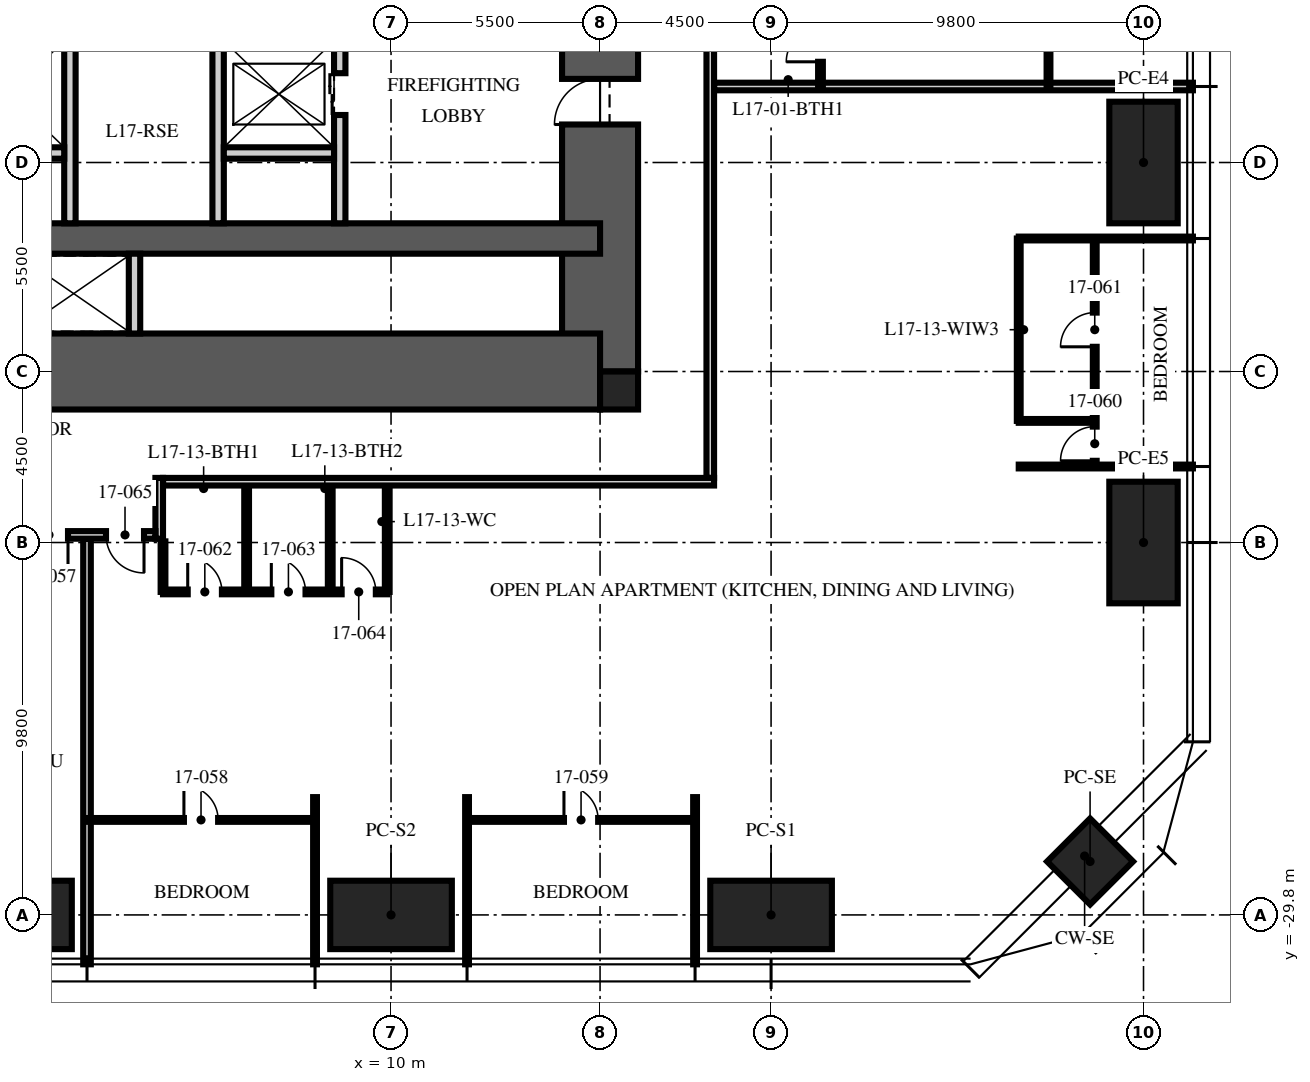
"""IFC4 building model, lengths in metres.
Left out: names, types, materials, properties, quantities, classifications, styles, units other than length and angle.
Written with IfcOpenShell. Run it as: python <this file> out.ifc"""

import sys

from ifc_helpers import new_model, si_unit, direction, frame, frame_2d, origin, origin_2d, place, context, subcontext, project, spatial, rectangle, hollow_rectangle, extrude, element, fill, save


model = new_model("IFC4")
c1 = context("Model", 3, precision=1e-05, world=origin(), true_north=direction((0.0, 1.0)))
c2 = subcontext(c1, "Body", "Model", "MODEL_VIEW")
j1 = project(units=[si_unit("LENGTHUNIT", "METRE"), si_unit("PLANEANGLEUNIT", "RADIAN")], contexts=[c1])
p1 = place(None, origin())
s1 = spatial("IfcSite", under=j1, at=p1, CompositionType="ELEMENT")
p2 = place(p1, origin())
s2 = spatial("IfcBuilding", under=s1, at=p2, CompositionType="ELEMENT")
p3 = place(p2, frame((0.0, 0.0, 69.75)))
s3 = spatial("IfcBuildingStorey", under=s2, at=p3, CompositionType="ELEMENT", Elevation=69.75)
p4 = place(p3, frame((15.5, -15.5, -0.25), z_axis=(0.0, 0.0, 1.0), x_axis=(0.0, 1.0, 0.0)))
e1 = element("IfcWall", 1, at=p4, inside=s3, PredefinedType="SHEAR", context=c2, shape_type="SweptSolid", body=[
    extrude(rectangle(XDim=31.0, YDim=2.0, at=frame_2d((15.5, 0.0))), origin(), (0.0, 0.0, 1.0), 3.75),
])
p5 = place(p4, frame((6.5, 0.0, 0.25)))
e2 = element("IfcOpeningElement", 2, at=p5, cuts=e1, PredefinedType="OPENING", context=c2, shape_type="SweptSolid", body=[
    extrude(rectangle(XDim=1.2, YDim=2.1, at=frame_2d((0.6, 1.05))), frame((0.0, 1.01, 0.0), z_axis=(0.0, -1.0, 0.0), x_axis=(1.0, 0.0, 0.0)), (0.0, 0.0, 1.0), 2.02),
])
p6 = place(p4, frame((23.0, 0.0, 0.25)))
e3 = element("IfcOpeningElement", 3, at=p6, cuts=e1, PredefinedType="OPENING", context=c2, shape_type="SweptSolid", body=[
    extrude(rectangle(XDim=1.8, YDim=2.1, at=frame_2d((0.9, 1.05))), frame((0.0, 1.01, 0.0), z_axis=(0.0, -1.0, 0.0), x_axis=(1.0, 0.0, 0.0)), (0.0, 0.0, 1.0), 2.02),
])
p7 = place(p3, frame((-15.5, -15.5, -0.25), z_axis=(0.0, 0.0, 1.0), x_axis=(1.0, 0.0, 0.0)))
e4 = element("IfcWall", 4, at=p7, inside=s3, PredefinedType="SHEAR", context=c2, shape_type="SweptSolid", body=[
    extrude(rectangle(XDim=31.0, YDim=2.0, at=frame_2d((15.5, 0.0))), origin(), (0.0, 0.0, 1.0), 3.75),
])
p8 = place(p3, frame((-15.5, -12.0, -0.25), z_axis=(0.0, 0.0, 1.0), x_axis=(1.0, 0.0, 0.0)))
e5 = element("IfcWall", 5, at=p8, inside=s3, PredefinedType="SHEAR", context=c2, shape_type="SweptSolid", body=[
    extrude(rectangle(XDim=31.0, YDim=0.8, at=frame_2d((15.5, 0.0))), origin(), (0.0, 0.0, 1.0), 3.75),
])
p9 = place(p3, frame((16.0, -16.0, -0.25), z_axis=(0.0, 0.0, 1.0), x_axis=(1.0, 0.0, 0.0)))
e6 = element("IfcColumn", 6, at=p9, inside=s3, PredefinedType="COLUMN", context=c2, shape_type="SweptSolid", body=[
    extrude(rectangle(XDim=1.0, YDim=1.0, at=origin_2d()), origin(), (0.0, 0.0, 1.0), 3.75),
])
for number, where, z_axis, x_axis in (
    (7, (29.8, -10.0, 0.0), (0.0, 0.0, 1.0), (0.0, 1.0, 0.0)),
    (8, (29.8, -20.0, 0.0), (0.0, 0.0, 1.0), (0.0, 1.0, 0.0)),
    (9, (20.0, -29.8, 0.0), (0.0, 0.0, 1.0), (1.0, 0.0, 0.0)),
    (10, (10.0, -29.8, 0.0), (0.0, 0.0, 1.0), (1.0, 0.0, 0.0)),
    (11, (0.0, -29.8, 0.0), (0.0, 0.0, 1.0), (1.0, 0.0, 0.0)),
):
    element("IfcColumn", number, at=place(p3, frame(where, z_axis=z_axis, x_axis=x_axis)), inside=s3, PredefinedType="COLUMN", context=c2, shape_type="SweptSolid", body=[
        extrude(hollow_rectangle(XDim=3.2, YDim=1.8, WallThickness=0.2, at=origin_2d()), origin(), (0.0, 0.0, 1.0), 3.75),
    ])
p10 = place(p3, frame((28.394, -28.394, 0.0), z_axis=(0.0, 0.0, 1.0), x_axis=(0.707106781187, 0.707106781187, 0.0)))
e12 = element("IfcColumn", 12, at=p10, inside=s3, PredefinedType="COLUMN", context=c2, shape_type="SweptSolid", body=[
    extrude(hollow_rectangle(XDim=1.6, YDim=1.6, WallThickness=0.1, at=origin_2d()), origin(), (0.0, 0.0, 1.0), 3.75),
])
p11 = place(p3, frame((8.65, -11.6, 0.0), z_axis=(0.0, 0.0, 1.0), x_axis=(0.0, 1.0, 0.0)))
e13 = element("IfcWall", 13, at=p11, inside=s3, PredefinedType="PARTITIONING", context=c2, shape_type="SweptSolid", body=[
    extrude(rectangle(XDim=6.7, YDim=0.3, at=frame_2d((3.35, 0.0))), origin(), (0.0, 0.0, 1.0), 3.5),
])
p12 = place(p11, frame((2.85, 0.0, 0.0)))
e14 = element("IfcOpeningElement", 14, at=p12, cuts=e13, PredefinedType="OPENING", context=c2, shape_type="SweptSolid", body=[
    extrude(rectangle(XDim=1.1, YDim=2.1, at=frame_2d((0.55, 1.05))), frame((0.0, 0.16, 0.0), z_axis=(0.0, -1.0, 0.0), x_axis=(1.0, 0.0, 0.0)), (0.0, 0.0, 1.0), 0.32),
])
for number, where, z_axis, x_axis in (
    (15, (1.55, -11.6, 0.0), (0.0, 0.0, 1.0), (0.0, 1.0, 0.0)),
    (16, (5.45, -11.6, 0.0), (0.0, 0.0, 1.0), (0.0, 1.0, 0.0)),
):
    element("IfcWall", number, at=place(p3, frame(where, z_axis=z_axis, x_axis=x_axis)), inside=s3, PredefinedType="PARTITIONING", context=c2, shape_type="SweptSolid", body=[
        extrude(rectangle(XDim=4.8, YDim=0.3, at=frame_2d((2.4, 0.0))), origin(), (0.0, 0.0, 1.0), 3.5),
    ])
for number, where, z_axis, x_axis in (
    (17, (-1.5, -9.75, 0.0), (0.0, 0.0, 1.0), (1.0, 0.0, 0.0)),
    (18, (5.6, -9.75, 0.0), (0.0, 0.0, 1.0), (1.0, 0.0, 0.0)),
):
    element("IfcWall", number, at=place(p3, frame(where, z_axis=z_axis, x_axis=x_axis)), inside=s3, PredefinedType="PARTITIONING", context=c2, shape_type="SweptSolid", body=[
        extrude(rectangle(XDim=2.9, YDim=0.3, at=frame_2d((1.45, 0.0))), origin(), (0.0, 0.0, 1.0), 3.5),
    ])
p13 = place(p3, frame((3.25, -14.5, 0.0), z_axis=(0.0, 0.0, 1.0), x_axis=(0.0, 1.0, 0.0)))
e19 = element("IfcWall", 19, at=p13, inside=s3, PredefinedType="PARTITIONING", context=c2, shape_type="SweptSolid", body=[
    extrude(rectangle(XDim=2.1, YDim=0.3, at=frame_2d((1.05, 0.0))), origin(), (0.0, 0.0, 1.0), 3.5),
])
p14 = place(p3, frame((18.5, -8.0, 0.0), z_axis=(0.0, 0.0, 1.0), x_axis=(1.0, 0.0, 0.0)))
e20 = element("IfcWall", 20, at=p14, inside=s3, PredefinedType="PARTITIONING", context=c2, shape_type="SweptSolid", body=[
    extrude(rectangle(XDim=12.6, YDim=0.2, at=frame_2d((6.3, 0.0))), origin(), (0.0, 0.0, 1.0), 2.71),
])
p15 = place(p3, frame((2.0, -19.9, 0.0), z_axis=(0.0, 0.0, 1.0), x_axis=(0.0, -1.0, 0.0)))
e21 = element("IfcWall", 21, at=p15, inside=s3, PredefinedType="PARTITIONING", context=c2, shape_type="SweptSolid", body=[
    extrude(rectangle(XDim=11.2, YDim=0.2, at=frame_2d((5.6, 0.0))), origin(), (0.0, 0.0, 1.0), 2.71),
])
for number, where, z_axis, x_axis in (
    (22, (8.0, -26.7, 0.0), (0.0, 0.0, 1.0), (0.0, -1.0, 0.0)),
    (23, (12.0, -26.7, 0.0), (0.0, 0.0, 1.0), (0.0, -1.0, 0.0)),
    (24, (18.0, -26.7, 0.0), (0.0, 0.0, 1.0), (0.0, -1.0, 0.0)),
):
    element("IfcWall", number, at=place(p3, frame(where, z_axis=z_axis, x_axis=x_axis)), inside=s3, PredefinedType="PARTITIONING", context=c2, shape_type="SweptSolid", body=[
        extrude(rectangle(XDim=4.4, YDim=0.1, at=frame_2d((2.2, 0.0))), origin(), (0.0, 0.0, 1.0), 2.71),
    ])
for number, where, z_axis, x_axis in (
    (25, (26.517, -18.0, 0.0), (0.0, 0.0, 1.0), (1.0, 0.0, 0.0)),
    (26, (26.517, -12.0, 0.0), (0.0, 0.0, 1.0), (1.0, 0.0, 0.0)),
):
    element("IfcWall", number, at=place(p3, frame(where, z_axis=z_axis, x_axis=x_axis)), inside=s3, PredefinedType="PARTITIONING", context=c2, shape_type="SweptSolid", body=[
        extrude(rectangle(XDim=4.583, YDim=0.1, at=frame_2d((2.292, 0.0))), origin(), (0.0, 0.0, 1.0), 2.71),
    ])
p16 = place(p3, frame((27.3, -8.0, 0.0), z_axis=(0.0, 0.0, 1.0), x_axis=(0.0, 1.0, 0.0)))
e27 = element("IfcWall", 27, at=p16, inside=s3, PredefinedType="PARTITIONING", context=c2, shape_type="SweptSolid", body=[
    extrude(rectangle(XDim=6.0, YDim=0.1, at=frame_2d((3.0, 0.0))), origin(), (0.0, 0.0, 1.0), 2.61),
])
p17 = place(p16, frame((2.55, 0.0, 0.0)))
e28 = element("IfcOpeningElement", 28, at=p17, cuts=e27, PredefinedType="OPENING", context=c2, shape_type="SweptSolid", body=[
    extrude(rectangle(XDim=0.9, YDim=2.1, at=frame_2d((0.45, 1.05))), frame((0.0, 0.06, 0.0), z_axis=(0.0, -1.0, 0.0), x_axis=(1.0, 0.0, 0.0)), (0.0, 0.0, 1.0), 0.12),
])
p18 = place(p3, frame((21.3, -8.0, 0.0), z_axis=(0.0, 0.0, 1.0), x_axis=(0.0, 1.0, 0.0)))
e29 = element("IfcWall", 29, at=p18, inside=s3, PredefinedType="PARTITIONING", context=c2, shape_type="SweptSolid", body=[
    extrude(rectangle(XDim=2.2, YDim=0.125, at=frame_2d((1.1, 0.0))), origin(), (0.0, 0.0, 1.0), 3.5),
])
p19 = place(p18, frame((0.65, 0.0, 0.0)))
e30 = element("IfcOpeningElement", 30, at=p19, cuts=e29, PredefinedType="OPENING", context=c2, shape_type="SweptSolid", body=[
    extrude(rectangle(XDim=0.9, YDim=2.1, at=frame_2d((0.45, 1.05))), frame((0.0, 0.073, 0.0), z_axis=(0.0, -1.0, 0.0), x_axis=(1.0, 0.0, 0.0)), (0.0, 0.0, 1.0), 0.145),
])
p20 = place(p3, frame((2.0, -27.3, 0.0), z_axis=(0.0, 0.0, 1.0), x_axis=(1.0, 0.0, 0.0)))
e31 = element("IfcWall", 31, at=p20, inside=s3, PredefinedType="PARTITIONING", context=c2, shape_type="SweptSolid", body=[
    extrude(rectangle(XDim=6.0, YDim=0.1, at=frame_2d((3.0, 0.0))), origin(), (0.0, 0.0, 1.0), 2.61),
])
p21 = place(p20, frame((2.55, 0.0, 0.0)))
e32 = element("IfcOpeningElement", 32, at=p21, cuts=e31, PredefinedType="OPENING", context=c2, shape_type="SweptSolid", body=[
    extrude(rectangle(XDim=0.9, YDim=2.1, at=frame_2d((0.45, 1.05))), frame((0.0, 0.06, 0.0), z_axis=(0.0, -1.0, 0.0), x_axis=(1.0, 0.0, 0.0)), (0.0, 0.0, 1.0), 0.12),
])
p22 = place(p3, frame((12.0, -27.3, 0.0), z_axis=(0.0, 0.0, 1.0), x_axis=(1.0, 0.0, 0.0)))
e33 = element("IfcWall", 33, at=p22, inside=s3, PredefinedType="PARTITIONING", context=c2, shape_type="SweptSolid", body=[
    extrude(rectangle(XDim=6.0, YDim=0.1, at=frame_2d((3.0, 0.0))), origin(), (0.0, 0.0, 1.0), 2.61),
])
p23 = place(p22, frame((2.55, 0.0, 0.0)))
e34 = element("IfcOpeningElement", 34, at=p23, cuts=e33, PredefinedType="OPENING", context=c2, shape_type="SweptSolid", body=[
    extrude(rectangle(XDim=0.9, YDim=2.1, at=frame_2d((0.45, 1.05))), frame((0.0, 0.06, 0.0), z_axis=(0.0, -1.0, 0.0), x_axis=(1.0, 0.0, 0.0)), (0.0, 0.0, 1.0), 0.12),
])
p24 = place(p3, frame((28.517, -18.0, 0.0), z_axis=(0.0, 0.0, 1.0), x_axis=(0.0, 1.0, 0.0)))
e35 = element("IfcWall", 35, at=p24, inside=s3, PredefinedType="PARTITIONING", context=c2, shape_type="SweptSolid", body=[
    extrude(rectangle(XDim=6.0, YDim=0.1, at=frame_2d((3.0, 0.0))), origin(), (0.0, 0.0, 1.0), 2.61),
])
p25 = place(p24, frame((0.15, 0.0, 0.0)))
e36 = element("IfcOpeningElement", 36, at=p25, cuts=e35, PredefinedType="OPENING", context=c2, shape_type="SweptSolid", body=[
    extrude(rectangle(XDim=0.9, YDim=2.1, at=frame_2d((0.45, 1.05))), frame((0.0, 0.06, 0.0), z_axis=(0.0, -1.0, 0.0), x_axis=(1.0, 0.0, 0.0)), (0.0, 0.0, 1.0), 0.12),
])
p26 = place(p24, frame((3.15, 0.0, 0.0)))
e37 = element("IfcOpeningElement", 37, at=p26, cuts=e35, PredefinedType="OPENING", context=c2, shape_type="SweptSolid", body=[
    extrude(rectangle(XDim=0.9, YDim=2.1, at=frame_2d((0.45, 1.05))), frame((0.0, 0.06, 0.0), z_axis=(0.0, -1.0, 0.0), x_axis=(1.0, 0.0, 0.0)), (0.0, 0.0, 1.0), 0.12),
])
p27 = place(p3, frame((26.517, -16.8, 0.0), z_axis=(0.0, 0.0, 1.0), x_axis=(1.0, 0.0, 0.0)))
e38 = element("IfcWall", 38, at=p27, inside=s3, PredefinedType="PARTITIONING", context=c2, shape_type="SweptSolid", body=[
    extrude(rectangle(XDim=2.0, YDim=0.1, at=frame_2d((1.0, 0.0))), origin(), (0.0, 0.0, 1.0), 3.5),
])
p28 = place(p3, frame((26.517, -16.8, 0.0), z_axis=(0.0, 0.0, 1.0), x_axis=(0.0, 1.0, 0.0)))
e39 = element("IfcWall", 39, at=p28, inside=s3, PredefinedType="PARTITIONING", context=c2, shape_type="SweptSolid", body=[
    extrude(rectangle(XDim=4.8, YDim=0.1, at=frame_2d((2.4, 0.0))), origin(), (0.0, 0.0, 1.0), 2.61),
])
p29 = place(p3, frame((4.0, -21.3, 0.0), z_axis=(0.0, 0.0, 1.0), x_axis=(1.0, 0.0, 0.0)))
e40 = element("IfcWall", 40, at=p29, inside=s3, PredefinedType="PARTITIONING", context=c2, shape_type="SweptSolid", body=[
    extrude(rectangle(XDim=5.9, YDim=0.125, at=frame_2d((2.95, 0.0))), origin(), (0.0, 0.0, 1.0), 2.492),
])
p30 = place(p29, frame((0.65, 0.0, 0.0)))
e41 = element("IfcOpeningElement", 41, at=p30, cuts=e40, PredefinedType="OPENING", context=c2, shape_type="SweptSolid", body=[
    extrude(rectangle(XDim=0.9, YDim=2.1, at=frame_2d((0.45, 1.05))), frame((0.0, 0.073, 0.0), z_axis=(0.0, -1.0, 0.0), x_axis=(1.0, 0.0, 0.0)), (0.0, 0.0, 1.0), 0.145),
])
p31 = place(p29, frame((2.85, 0.0, 0.0)))
e42 = element("IfcOpeningElement", 42, at=p31, cuts=e40, PredefinedType="OPENING", context=c2, shape_type="SweptSolid", body=[
    extrude(rectangle(XDim=0.9, YDim=2.1, at=frame_2d((0.45, 1.05))), frame((0.0, 0.073, 0.0), z_axis=(0.0, -1.0, 0.0), x_axis=(1.0, 0.0, 0.0)), (0.0, 0.0, 1.0), 0.145),
])
p32 = place(p29, frame((4.7, 0.0, 0.0)))
e43 = element("IfcOpeningElement", 43, at=p32, cuts=e40, PredefinedType="OPENING", context=c2, shape_type="SweptSolid", body=[
    extrude(rectangle(XDim=0.9, YDim=2.1, at=frame_2d((0.45, 1.05))), frame((0.0, 0.073, 0.0), z_axis=(0.0, -1.0, 0.0), x_axis=(1.0, 0.0, 0.0)), (0.0, 0.0, 1.0), 0.145),
])
p33 = place(p3, frame((4.0, -19.97, 0.0), z_axis=(0.0, 0.0, 1.0), x_axis=(0.0, -1.0, 0.0)))
e44 = element("IfcWall", 44, at=p33, inside=s3, PredefinedType="PARTITIONING", context=c2, shape_type="SweptSolid", body=[
    extrude(rectangle(XDim=1.33, YDim=0.125, at=frame_2d((0.665, 0.0))), origin(), (0.0, 0.0, 1.0), 3.5),
])
for number, where, z_axis, x_axis in (
    (45, (6.2, -18.5, 0.0), (0.0, 0.0, 1.0), (0.0, -1.0, 0.0)),
    (46, (8.4, -18.5, 0.0), (0.0, 0.0, 1.0), (0.0, -1.0, 0.0)),
):
    element("IfcWall", number, at=place(p3, frame(where, z_axis=z_axis, x_axis=x_axis)), inside=s3, PredefinedType="PARTITIONING", context=c2, shape_type="SweptSolid", body=[
        extrude(rectangle(XDim=2.8, YDim=0.125, at=frame_2d((1.4, 0.0))), origin(), (0.0, 0.0, 1.0), 3.5),
    ])
p34 = place(p3, frame((9.9, -18.5, 0.0), z_axis=(0.0, 0.0, 1.0), x_axis=(0.0, -1.0, 0.0)))
e47 = element("IfcWall", 47, at=p34, inside=s3, PredefinedType="PARTITIONING", context=c2, shape_type="SweptSolid", body=[
    extrude(rectangle(XDim=2.8, YDim=0.125, at=frame_2d((1.4, 0.0))), origin(), (0.0, 0.0, 1.0), 2.492),
])
p35 = place(p3, frame((18.4, -18.3, 0.0), z_axis=(0.0, 0.0, 1.0), x_axis=(0.0, 1.0, 0.0)))
e48 = element("IfcWall", 48, at=p35, inside=s3, PredefinedType="PARTITIONING", context=c2, shape_type="SweptSolid", body=[
    extrude(rectangle(XDim=18.3, YDim=0.2, at=frame_2d((9.15, 0.0))), origin(), (0.0, 0.0, 1.0), 2.3),
])
p36 = place(p3, frame((18.5, -18.4, 0.0), z_axis=(0.0, 0.0, 1.0), x_axis=(-1.0, 0.0, 0.0)))
e49 = element("IfcWall", 49, at=p36, inside=s3, PredefinedType="PARTITIONING", context=c2, shape_type="SweptSolid", body=[
    extrude(rectangle(XDim=14.5, YDim=0.2, at=frame_2d((7.25, 0.0))), origin(), (0.0, 0.0, 1.0), 2.3),
])
p37 = place(p3, frame((3.9, -18.3, 0.0), z_axis=(0.0, 0.0, 1.0), x_axis=(0.0, -1.0, 0.0)))
e50 = element("IfcWall", 50, at=p37, inside=s3, PredefinedType="PARTITIONING", context=c2, shape_type="SweptSolid", body=[
    extrude(rectangle(XDim=1.6, YDim=0.2, at=frame_2d((0.8, 0.0))), origin(), (0.0, 0.0, 1.0), 3.5),
])
p38 = place(p3, frame((3.8, -19.8, 0.0), z_axis=(0.0, 0.0, 1.0), x_axis=(-1.0, 0.0, 0.0)))
e51 = element("IfcWall", 51, at=p38, inside=s3, PredefinedType="PARTITIONING", context=c2, shape_type="SweptSolid", body=[
    extrude(rectangle(XDim=3.6, YDim=0.2, at=frame_2d((1.8, 0.0))), origin(), (0.0, 0.0, 1.0), 3.5),
])
p39 = place(p38, frame((2.3, 0.0, 0.0)))
e52 = element("IfcOpeningElement", 52, at=p39, cuts=e51, PredefinedType="OPENING", context=c2, shape_type="SweptSolid", body=[
    extrude(rectangle(XDim=1.0, YDim=2.2, at=frame_2d((0.5, 1.1))), frame((0.0, 0.11, 0.0), z_axis=(0.0, -1.0, 0.0), x_axis=(1.0, 0.0, 0.0)), (0.0, 0.0, 1.0), 0.22),
])
p40 = place(p38, frame((0.3, 0.0, 0.0)))
e53 = element("IfcOpeningElement", 53, at=p40, cuts=e51, PredefinedType="OPENING", context=c2, shape_type="SweptSolid", body=[
    extrude(rectangle(XDim=1.0, YDim=2.2, at=frame_2d((0.5, 1.1))), frame((0.0, 0.11, 0.0), z_axis=(0.0, -1.0, 0.0), x_axis=(1.0, 0.0, 0.0)), (0.0, 0.0, 1.0), 0.22),
])
p41 = place(p5, origin())
e54 = element("IfcDoor", 54, at=p41, inside=s3, OperationType="SINGLE_SWING_LEFT", PredefinedType="DOOR", context=c2, shape_type="SweptSolid", body=[
    extrude(rectangle(XDim=1.2, YDim=2.1, at=frame_2d((0.6, 1.05))), frame((0.0, 0.025, 0.0), z_axis=(0.0, -1.0, 0.0), x_axis=(1.0, 0.0, 0.0)), (0.0, 0.0, 1.0), 0.05),
])
fill(e2, e54)
p42 = place(p12, origin())
e55 = element("IfcDoor", 55, at=p42, inside=s3, OperationType="DOUBLE_DOOR_SLIDING", PredefinedType="DOOR", context=c2, shape_type="SweptSolid", body=[
    extrude(rectangle(XDim=1.1, YDim=2.1, at=frame_2d((0.55, 1.05))), frame((0.0, 0.025, 0.0), z_axis=(0.0, -1.0, 0.0), x_axis=(1.0, 0.0, 0.0)), (0.0, 0.0, 1.0), 0.05),
])
fill(e14, e55)
p43 = place(p19, origin())
e56 = element("IfcDoor", 56, at=p43, inside=s3, OperationType="SINGLE_SWING_LEFT", PredefinedType="DOOR", context=c2, shape_type="SweptSolid", body=[
    extrude(rectangle(XDim=0.9, YDim=2.1, at=frame_2d((0.45, 1.05))), frame((0.0, 0.025, 0.0), z_axis=(0.0, -1.0, 0.0), x_axis=(1.0, 0.0, 0.0)), (0.0, 0.0, 1.0), 0.05),
])
fill(e30, e56)
p44 = place(p39, origin())
e57 = element("IfcDoor", 57, at=p44, inside=s3, OperationType="SINGLE_SWING_LEFT", PredefinedType="DOOR", context=c2, shape_type="SweptSolid", body=[
    extrude(rectangle(XDim=1.0, YDim=2.2, at=frame_2d((0.5, 1.1))), frame((0.0, 0.025, 0.0), z_axis=(0.0, -1.0, 0.0), x_axis=(1.0, 0.0, 0.0)), (0.0, 0.0, 1.0), 0.05),
])
fill(e52, e57)
p45 = place(p21, origin())
e58 = element("IfcDoor", 58, at=p45, inside=s3, OperationType="SINGLE_SWING_LEFT", PredefinedType="DOOR", context=c2, shape_type="SweptSolid", body=[
    extrude(rectangle(XDim=0.9, YDim=2.1, at=frame_2d((0.45, 1.05))), frame((0.0, 0.025, 0.0), z_axis=(0.0, -1.0, 0.0), x_axis=(1.0, 0.0, 0.0)), (0.0, 0.0, 1.0), 0.05),
])
fill(e32, e58)
p46 = place(p23, origin())
e59 = element("IfcDoor", 59, at=p46, inside=s3, OperationType="SINGLE_SWING_LEFT", PredefinedType="DOOR", context=c2, shape_type="SweptSolid", body=[
    extrude(rectangle(XDim=0.9, YDim=2.1, at=frame_2d((0.45, 1.05))), frame((0.0, 0.025, 0.0), z_axis=(0.0, -1.0, 0.0), x_axis=(1.0, 0.0, 0.0)), (0.0, 0.0, 1.0), 0.05),
])
fill(e34, e59)
p47 = place(p25, origin())
e60 = element("IfcDoor", 60, at=p47, inside=s3, OperationType="SINGLE_SWING_LEFT", PredefinedType="DOOR", context=c2, shape_type="SweptSolid", body=[
    extrude(rectangle(XDim=0.9, YDim=2.1, at=frame_2d((0.45, 1.05))), frame((0.0, 0.025, 0.0), z_axis=(0.0, -1.0, 0.0), x_axis=(1.0, 0.0, 0.0)), (0.0, 0.0, 1.0), 0.05),
])
fill(e36, e60)
p48 = place(p26, origin())
e61 = element("IfcDoor", 61, at=p48, inside=s3, OperationType="SINGLE_SWING_LEFT", PredefinedType="DOOR", context=c2, shape_type="SweptSolid", body=[
    extrude(rectangle(XDim=0.9, YDim=2.1, at=frame_2d((0.45, 1.05))), frame((0.0, 0.025, 0.0), z_axis=(0.0, -1.0, 0.0), x_axis=(1.0, 0.0, 0.0)), (0.0, 0.0, 1.0), 0.05),
])
fill(e37, e61)
p49 = place(p30, origin())
e62 = element("IfcDoor", 62, at=p49, inside=s3, OperationType="SINGLE_SWING_LEFT", PredefinedType="DOOR", context=c2, shape_type="SweptSolid", body=[
    extrude(rectangle(XDim=0.9, YDim=2.1, at=frame_2d((0.45, 1.05))), frame((0.0, 0.025, 0.0), z_axis=(0.0, -1.0, 0.0), x_axis=(1.0, 0.0, 0.0)), (0.0, 0.0, 1.0), 0.05),
])
fill(e41, e62)
p50 = place(p31, origin())
e63 = element("IfcDoor", 63, at=p50, inside=s3, OperationType="SINGLE_SWING_LEFT", PredefinedType="DOOR", context=c2, shape_type="SweptSolid", body=[
    extrude(rectangle(XDim=0.9, YDim=2.1, at=frame_2d((0.45, 1.05))), frame((0.0, 0.025, 0.0), z_axis=(0.0, -1.0, 0.0), x_axis=(1.0, 0.0, 0.0)), (0.0, 0.0, 1.0), 0.05),
])
fill(e42, e63)
p51 = place(p32, origin())
e64 = element("IfcDoor", 64, at=p51, inside=s3, OperationType="SINGLE_SWING_LEFT", PredefinedType="DOOR", context=c2, shape_type="SweptSolid", body=[
    extrude(rectangle(XDim=0.9, YDim=2.1, at=frame_2d((0.45, 1.05))), frame((0.0, 0.025, 0.0), z_axis=(0.0, -1.0, 0.0), x_axis=(1.0, 0.0, 0.0)), (0.0, 0.0, 1.0), 0.05),
])
fill(e43, e64)
p52 = place(p40, origin())
e65 = element("IfcDoor", 65, at=p52, inside=s3, OperationType="SINGLE_SWING_LEFT", PredefinedType="DOOR", context=c2, shape_type="SweptSolid", body=[
    extrude(rectangle(XDim=1.0, YDim=2.2, at=frame_2d((0.5, 1.1))), frame((0.0, 0.025, 0.0), z_axis=(0.0, -1.0, 0.0), x_axis=(1.0, 0.0, 0.0)), (0.0, 0.0, 1.0), 0.05),
])
fill(e53, e65)
save(model, sys.argv[1])
